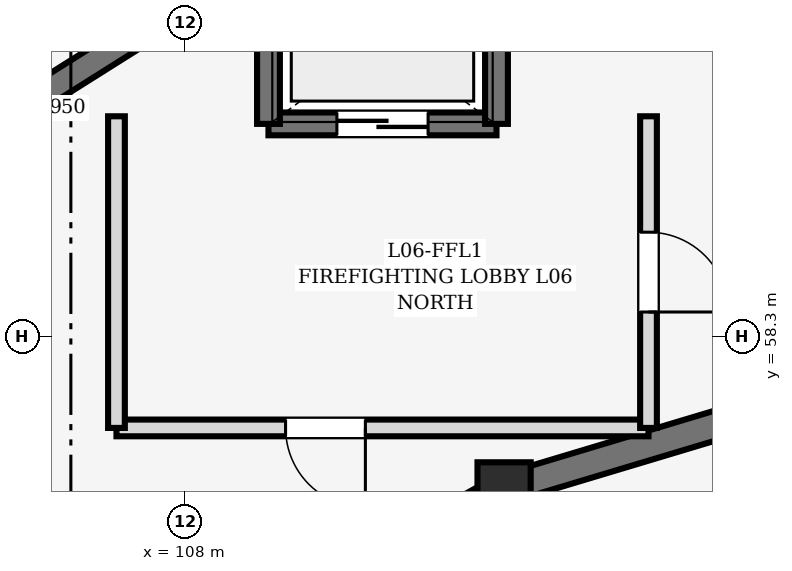
"""IFC4 building model, lengths in metres.
Left out: names, types, materials, properties, quantities, classifications, styles, units other than length and angle.
Written with IfcOpenShell. Run it as: python <this file> out.ifc"""

import sys

from ifc_helpers import new_model, si_unit, direction, frame, frame_2d, origin, origin_2d, place, context, subcontext, project, spatial, rectangle, extrude, element, fill, save


model = new_model("IFC4")
c1 = context("Model", 3, precision=1e-05, world=origin(), true_north=direction((0.0, 1.0)))
c2 = subcontext(c1, "Body", "Model", "MODEL_VIEW")
j1 = project(units=[si_unit("LENGTHUNIT", "METRE"), si_unit("PLANEANGLEUNIT", "RADIAN")], contexts=[c1])
p1 = place(None, origin())
s1 = spatial("IfcSite", under=j1, at=p1, CompositionType="ELEMENT")
p2 = place(p1, origin())
s2 = spatial("IfcBuilding", under=s1, at=p2, CompositionType="ELEMENT")
p3 = place(p2, frame((0.0, 0.0, 23.7)))
s3 = spatial("IfcBuildingStorey", under=s2, at=p3, CompositionType="ELEMENT", Elevation=23.7)
p4 = place(p3, frame((112.2, 56.298, 0.0), z_axis=(0.0, 0.0, 1.0), x_axis=(1.0, 0.0, 0.0)))
e1 = element("IfcColumn", 1, at=p4, inside=s3, PredefinedType="COLUMN", context=c2, shape_type="SweptSolid", body=[
    extrude(rectangle(XDim=0.7, YDim=0.7, at=origin_2d()), origin(), (0.0, 0.0, 1.0), 4.5),
])
p5 = place(p3, frame((116.654, 57.634, 0.0), z_axis=(0.0, 0.0, 1.0), x_axis=(-0.957792414988, -0.287460762177, 0.0)))
e2 = element("IfcWall", 2, at=p5, inside=s3, PredefinedType="SOLIDWALL", context=c2, shape_type="SweptSolid", body=[
    extrude(rectangle(XDim=4.365, YDim=0.38, at=frame_2d((2.183, 0.0))), origin(), (0.0, 0.0, 1.0), 4.5),
])
p6 = place(p3, frame((111.951, 56.159, 0.0), z_axis=(0.0, 0.0, 1.0), x_axis=(-0.87401308715, -0.485902380618, 0.0)))
e3 = element("IfcWall", 3, at=p6, inside=s3, PredefinedType="SOLIDWALL", context=c2, shape_type="SweptSolid", body=[
    extrude(rectangle(XDim=4.074, YDim=0.38, at=frame_2d((2.037, 0.0))), origin(), (0.0, 0.0, 1.0), 4.5),
])
p7 = place(p6, frame((1.507, 0.0, 0.0)))
e4 = element("IfcOpeningElement", 4, at=p7, cuts=e3, PredefinedType="OPENING", context=c2, shape_type="SweptSolid", body=[
    extrude(rectangle(XDim=1.06, YDim=2.24, at=frame_2d((0.53, 1.12))), frame((0.0, 0.202, 0.0), z_axis=(0.0, -1.0, 0.0), x_axis=(1.0, 0.0, 0.0)), (0.0, 0.0, 1.0), 0.404),
])
p8 = place(p3, frame((108.346, 62.893, 0.0), z_axis=(0.0, 0.0, 1.0), x_axis=(-0.846132783073, -0.532972150688, 0.0)))
e5 = element("IfcWall", 5, at=p8, inside=s3, PredefinedType="SHEAR", context=c2, shape_type="SweptSolid", body=[
    extrude(rectangle(XDim=5.95, YDim=0.35, at=frame_2d((2.975, 0.0))), origin(), (0.0, 0.0, 1.0), 3.5),
])
p9 = place(p3, frame((112.1, 61.1, 0.0), z_axis=(0.0, 0.0, 1.0), x_axis=(-1.0, 0.0, 0.0)))
e6 = element("IfcWall", 6, at=p9, inside=s3, PredefinedType="SHEAR", context=c2, shape_type="SweptSolid", body=[
    extrude(rectangle(XDim=3.0, YDim=0.3, at=frame_2d((1.5, 0.0))), origin(), (0.0, 0.0, 1.0), 4.5),
])
p10 = place(p9, frame((0.9, 0.0, 0.0)))
e7 = element("IfcOpeningElement", 7, at=p10, cuts=e6, PredefinedType="OPENING", context=c2, shape_type="SweptSolid", body=[
    extrude(rectangle(XDim=1.2, YDim=2.15, at=frame_2d((0.6, 1.075))), frame((0.0, 0.162, 0.0), z_axis=(0.0, -1.0, 0.0), x_axis=(1.0, 0.0, 0.0)), (0.0, 0.0, 1.0), 0.324),
])
for number, where, z_axis, x_axis in (
    (8, (112.1, 63.3, 0.0), (0.0, 0.0, 1.0), (0.0, -1.0, 0.0)),
    (9, (109.1, 61.1, 0.0), (0.0, 0.0, 1.0), (0.0, 1.0, 0.0)),
):
    element("IfcWall", number, at=place(p3, frame(where, z_axis=z_axis, x_axis=x_axis)), inside=s3, PredefinedType="SHEAR", context=c2, shape_type="SweptSolid", body=[
        extrude(rectangle(XDim=2.2, YDim=0.3, at=frame_2d((1.1, 0.0))), origin(), (0.0, 0.0, 1.0), 4.5),
    ])
p11 = place(p3, frame((114.1, 57.1, 0.0), z_axis=(0.0, 0.0, 1.0), x_axis=(-1.0, 0.0, 0.0)))
e10 = element("IfcWall", 10, at=p11, inside=s3, PredefinedType="SOLIDWALL", context=c2, shape_type="SweptSolid", body=[
    extrude(rectangle(XDim=7.0, YDim=0.22, at=frame_2d((3.5, 0.0))), origin(), (0.0, 0.0, 1.0), 4.485),
])
p12 = place(p11, frame((3.725, 0.0, 0.0)))
e11 = element("IfcOpeningElement", 11, at=p12, cuts=e10, PredefinedType="OPENING", context=c2, shape_type="SweptSolid", body=[
    extrude(rectangle(XDim=1.05, YDim=2.15, at=frame_2d((0.525, 1.075))), frame((0.0, 0.122, 0.0), z_axis=(0.0, -1.0, 0.0), x_axis=(1.0, 0.0, 0.0)), (0.0, 0.0, 1.0), 0.244),
])
p13 = place(p3, frame((107.1, 57.1, 0.0), z_axis=(0.0, 0.0, 1.0), x_axis=(0.0, 1.0, 0.0)))
e12 = element("IfcWall", 12, at=p13, inside=s3, PredefinedType="SOLIDWALL", context=c2, shape_type="SweptSolid", body=[
    extrude(rectangle(XDim=4.1, YDim=0.22, at=frame_2d((2.05, 0.0))), origin(), (0.0, 0.0, 1.0), 4.485),
])
p14 = place(p3, frame((114.1, 61.2, 0.0), z_axis=(0.0, 0.0, 1.0), x_axis=(0.0, -1.0, 0.0)))
e13 = element("IfcWall", 13, at=p14, inside=s3, PredefinedType="SOLIDWALL", context=c2, shape_type="SweptSolid", body=[
    extrude(rectangle(XDim=4.1, YDim=0.22, at=frame_2d((2.05, 0.0))), origin(), (0.0, 0.0, 1.0), 4.485),
])
p15 = place(p14, frame((1.525, 0.0, 0.0)))
e14 = element("IfcOpeningElement", 14, at=p15, cuts=e13, PredefinedType="OPENING", context=c2, shape_type="SweptSolid", body=[
    extrude(rectangle(XDim=1.05, YDim=2.15, at=frame_2d((0.525, 1.075))), frame((0.0, 0.122, 0.0), z_axis=(0.0, -1.0, 0.0), x_axis=(1.0, 0.0, 0.0)), (0.0, 0.0, 1.0), 0.244),
])
p16 = place(p10, origin())
e15 = element("IfcDoor", 15, at=p16, inside=s3, OperationType="DOUBLE_DOOR_SLIDING", PredefinedType="DOOR", context=c2, shape_type="SweptSolid", body=[
    extrude(rectangle(XDim=1.2, YDim=2.15, at=frame_2d((0.6, 1.075))), frame((0.0, 0.025, 0.0), z_axis=(0.0, -1.0, 0.0), x_axis=(1.0, 0.0, 0.0)), (0.0, 0.0, 1.0), 0.05),
])
fill(e7, e15)
p17 = place(p12, origin())
e16 = element("IfcDoor", 16, at=p17, inside=s3, OperationType="SINGLE_SWING_LEFT", PredefinedType="DOOR", context=c2, shape_type="SweptSolid", body=[
    extrude(rectangle(XDim=1.05, YDim=2.15, at=frame_2d((0.525, 1.075))), frame((0.0, 0.025, 0.0), z_axis=(0.0, -1.0, 0.0), x_axis=(1.0, 0.0, 0.0)), (0.0, 0.0, 1.0), 0.05),
])
fill(e11, e16)
p18 = place(p15, origin())
e17 = element("IfcDoor", 17, at=p18, inside=s3, OperationType="SINGLE_SWING_RIGHT", PredefinedType="DOOR", context=c2, shape_type="SweptSolid", body=[
    extrude(rectangle(XDim=1.05, YDim=2.15, at=frame_2d((0.525, 1.075))), frame((0.0, 0.025, 0.0), z_axis=(0.0, -1.0, 0.0), x_axis=(1.0, 0.0, 0.0)), (0.0, 0.0, 1.0), 0.05),
])
fill(e14, e17)
save(model, sys.argv[1])
